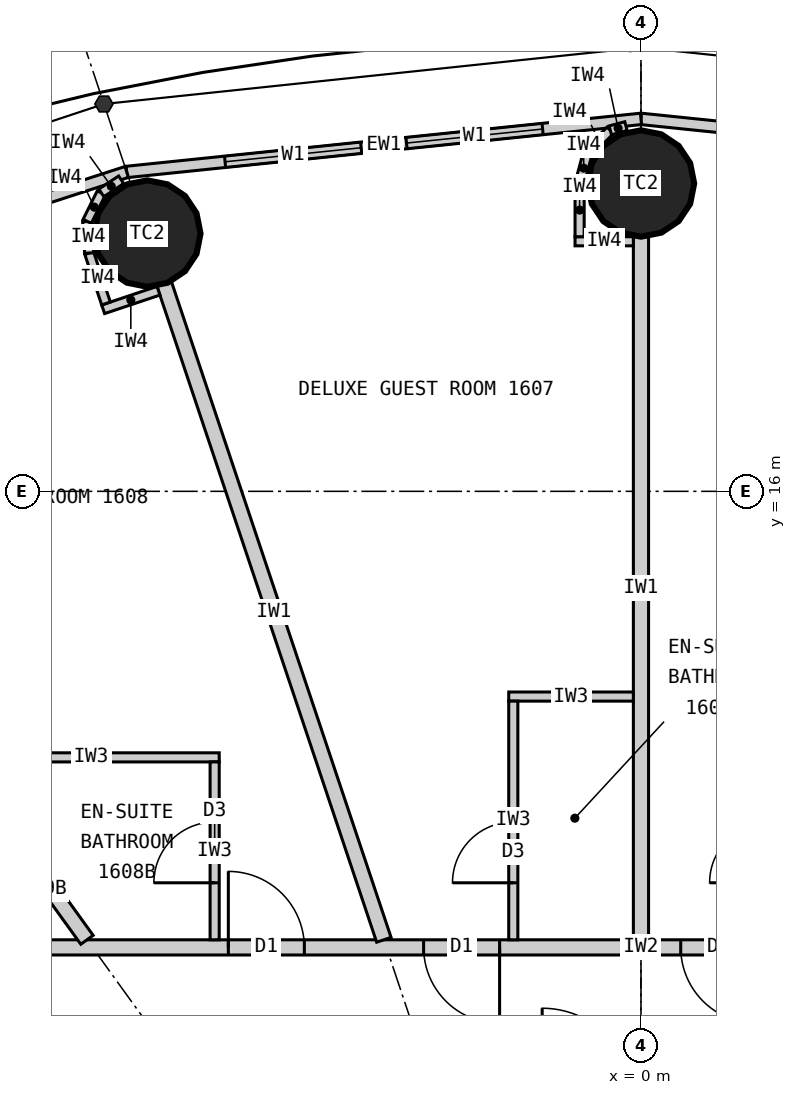
"""IFC4 building model, lengths in metres.
Left out: names, types, materials, properties, quantities, classifications, styles, units other than length and angle.
Written with IfcOpenShell. Run it as: python <this file> out.ifc"""

import sys

from ifc_helpers import new_model, si_unit, direction, frame, frame_2d, origin, origin_2d, place, context, subcontext, project, spatial, rectangle, circle, extrude, element, fill, save


model = new_model("IFC4")
c1 = context("Model", 3, precision=1e-05, world=origin(), true_north=direction((0.0, 1.0)))
c2 = subcontext(c1, "Body", "Model", "MODEL_VIEW")
j1 = project(units=[si_unit("LENGTHUNIT", "METRE"), si_unit("PLANEANGLEUNIT", "RADIAN")], contexts=[c1])
p1 = place(None, origin())
s1 = spatial("IfcSite", under=j1, at=p1, CompositionType="ELEMENT")
p2 = place(p1, origin())
s2 = spatial("IfcBuilding", under=s1, at=p2, CompositionType="ELEMENT")
p3 = place(p2, frame((0.0, 0.0, 67.2)))
s3 = spatial("IfcBuildingStorey", under=s2, at=p3, CompositionType="ELEMENT", Elevation=67.2)
for number, where, z_axis, x_axis in (
    (1, (0.0, 20.05, 0.0), (0.0, 0.0, 1.0), (1.0, 0.0, 0.0)),
    (2, (-6.495, 19.391, 0.0), (0.0, 0.0, 1.0), (1.0, 0.0, 0.0)),
):
    element("IfcColumn", number, at=place(p3, frame(where, z_axis=z_axis, x_axis=x_axis)), inside=s3, PredefinedType="COLUMN", context=c2, shape_type="SweptSolid", body=[
        extrude(circle(Radius=0.7, at=origin_2d()), origin(), (0.0, 0.0, 1.0), 3.3),
    ])
p4 = place(p3, frame((6.766, 20.202, 0.0), z_axis=(0.0, 0.0, 1.0), x_axis=(-0.994721394369, 0.102612609291, 0.0)))
e3 = element("IfcWall", 3, at=p4, inside=s3, PredefinedType="ELEMENTEDWALL", context=c2, shape_type="SweptSolid", body=[
    extrude(rectangle(XDim=6.802, YDim=0.15, at=frame_2d((3.401, 0.0))), origin(), (0.0, 0.0, 1.0), 3.12),
])
p5 = place(p4, frame((1.301, 0.0, 0.9)))
e4 = element("IfcOpeningElement", 4, at=p5, cuts=e3, PredefinedType="OPENING", context=c2, shape_type="SweptSolid", body=[
    extrude(rectangle(XDim=1.8, YDim=1.9, at=frame_2d((0.9, 0.95))), frame((0.0, 0.085, 0.0), z_axis=(0.0, -1.0, 0.0), x_axis=(1.0, 0.0, 0.0)), (0.0, 0.0, 1.0), 0.17),
])
p6 = place(p4, frame((3.701, 0.0, 0.9)))
e5 = element("IfcOpeningElement", 5, at=p6, cuts=e3, PredefinedType="OPENING", context=c2, shape_type="SweptSolid", body=[
    extrude(rectangle(XDim=1.8, YDim=1.9, at=frame_2d((0.9, 0.95))), frame((0.0, 0.085, 0.0), z_axis=(0.0, -1.0, 0.0), x_axis=(1.0, 0.0, 0.0)), (0.0, 0.0, 1.0), 0.17),
])
p7 = place(p3, frame((0.0, 20.9, 0.0), z_axis=(0.0, 0.0, 1.0), x_axis=(-0.994721394369, -0.102612609291, 0.0)))
e6 = element("IfcWall", 6, at=p7, inside=s3, PredefinedType="ELEMENTEDWALL", context=c2, shape_type="SweptSolid", body=[
    extrude(rectangle(XDim=6.802, YDim=0.15, at=frame_2d((3.401, 0.0))), origin(), (0.0, 0.0, 1.0), 3.12),
])
p8 = place(p7, frame((1.301, 0.0, 0.9)))
e7 = element("IfcOpeningElement", 7, at=p8, cuts=e6, PredefinedType="OPENING", context=c2, shape_type="SweptSolid", body=[
    extrude(rectangle(XDim=1.8, YDim=1.9, at=frame_2d((0.9, 0.95))), frame((0.0, 0.085, 0.0), z_axis=(0.0, -1.0, 0.0), x_axis=(1.0, 0.0, 0.0)), (0.0, 0.0, 1.0), 0.17),
])
p9 = place(p7, frame((3.701, 0.0, 0.9)))
e8 = element("IfcOpeningElement", 8, at=p9, cuts=e6, PredefinedType="OPENING", context=c2, shape_type="SweptSolid", body=[
    extrude(rectangle(XDim=1.8, YDim=1.9, at=frame_2d((0.9, 0.95))), frame((0.0, 0.085, 0.0), z_axis=(0.0, -1.0, 0.0), x_axis=(1.0, 0.0, 0.0)), (0.0, 0.0, 1.0), 0.17),
])
p10 = place(p3, frame((-6.766, 20.202, 0.0), z_axis=(0.0, 0.0, 1.0), x_axis=(-0.951137534625, -0.308767534285, 0.0)))
e9 = element("IfcWall", 9, at=p10, inside=s3, PredefinedType="ELEMENTEDWALL", context=c2, shape_type="SweptSolid", body=[
    extrude(rectangle(XDim=6.655, YDim=0.15, at=frame_2d((3.328, 0.0))), origin(), (0.0, 0.0, 1.0), 3.12),
])
p11 = place(p10, frame((1.228, 0.0, 0.9)))
e10 = element("IfcOpeningElement", 10, at=p11, cuts=e9, PredefinedType="OPENING", context=c2, shape_type="SweptSolid", body=[
    extrude(rectangle(XDim=1.8, YDim=1.9, at=frame_2d((0.9, 0.95))), frame((0.0, 0.085, 0.0), z_axis=(0.0, -1.0, 0.0), x_axis=(1.0, 0.0, 0.0)), (0.0, 0.0, 1.0), 0.17),
])
p12 = place(p10, frame((3.628, 0.0, 0.9)))
e11 = element("IfcOpeningElement", 11, at=p12, cuts=e9, PredefinedType="OPENING", context=c2, shape_type="SweptSolid", body=[
    extrude(rectangle(XDim=1.8, YDim=1.9, at=frame_2d((0.9, 0.95))), frame((0.0, 0.085, 0.0), z_axis=(0.0, -1.0, 0.0), x_axis=(1.0, 0.0, 0.0)), (0.0, 0.0, 1.0), 0.17),
])
p13 = place(p3, frame((-14.1, 10.0, 0.0), z_axis=(0.0, 0.0, 1.0), x_axis=(1.0, 0.0, 0.0)))
e12 = element("IfcWall", 12, at=p13, inside=s3, PredefinedType="PARTITIONING", context=c2, shape_type="SweptSolid", body=[
    extrude(rectangle(XDim=28.2, YDim=0.2, at=frame_2d((14.1, 0.0))), origin(), (0.0, 0.0, 1.0), 3.12),
])
p14 = place(p13, frame((18.529, 0.0, 0.0)))
e13 = element("IfcOpeningElement", 13, at=p14, cuts=e12, PredefinedType="OPENING", context=c2, shape_type="SweptSolid", body=[
    extrude(rectangle(XDim=1.0, YDim=2.2, at=frame_2d((0.5, 1.1))), frame((0.0, 0.11, 0.0), z_axis=(0.0, -1.0, 0.0), x_axis=(1.0, 0.0, 0.0)), (0.0, 0.0, 1.0), 0.22),
])
p15 = place(p13, frame((14.623, 0.0, 0.0)))
e14 = element("IfcOpeningElement", 14, at=p15, cuts=e12, PredefinedType="OPENING", context=c2, shape_type="SweptSolid", body=[
    extrude(rectangle(XDim=1.0, YDim=2.2, at=frame_2d((0.5, 1.1))), frame((0.0, 0.11, 0.0), z_axis=(0.0, -1.0, 0.0), x_axis=(1.0, 0.0, 0.0)), (0.0, 0.0, 1.0), 0.22),
])
p16 = place(p13, frame((11.24, 0.0, 0.0)))
e15 = element("IfcOpeningElement", 15, at=p16, cuts=e12, PredefinedType="OPENING", context=c2, shape_type="SweptSolid", body=[
    extrude(rectangle(XDim=1.0, YDim=2.2, at=frame_2d((0.5, 1.1))), frame((0.0, 0.11, 0.0), z_axis=(0.0, -1.0, 0.0), x_axis=(1.0, 0.0, 0.0)), (0.0, 0.0, 1.0), 0.22),
])
p17 = place(p13, frame((8.671, 0.0, 0.0)))
e16 = element("IfcOpeningElement", 16, at=p17, cuts=e12, PredefinedType="OPENING", context=c2, shape_type="SweptSolid", body=[
    extrude(rectangle(XDim=1.0, YDim=2.2, at=frame_2d((0.5, 1.1))), frame((0.0, 0.11, 0.0), z_axis=(0.0, -1.0, 0.0), x_axis=(1.0, 0.0, 0.0)), (0.0, 0.0, 1.0), 0.22),
])
p18 = place(p13, frame((2.801, 0.0, 0.0)))
e17 = element("IfcOpeningElement", 17, at=p18, cuts=e12, PredefinedType="OPENING", context=c2, shape_type="SweptSolid", body=[
    extrude(rectangle(XDim=1.0, YDim=2.2, at=frame_2d((0.5, 1.1))), frame((0.0, 0.11, 0.0), z_axis=(0.0, -1.0, 0.0), x_axis=(1.0, 0.0, 0.0)), (0.0, 0.0, 1.0), 0.22),
])
p19 = place(p3, frame((0.0, 10.1, 0.0), z_axis=(0.0, 0.0, 1.0), x_axis=(0.0, 1.0, 0.0)))
e18 = element("IfcWall", 18, at=p19, inside=s3, PredefinedType="PARTITIONING", context=c2, shape_type="SweptSolid", body=[
    extrude(rectangle(XDim=9.25, YDim=0.2, at=frame_2d((4.625, 0.0))), origin(), (0.0, 0.0, 1.0), 2.32),
])
p20 = place(p3, frame((-3.383, 10.1, 0.0), z_axis=(0.0, 0.0, 1.0), x_axis=(-0.31759592231, 0.948226149256, 0.0)))
e19 = element("IfcWall", 19, at=p20, inside=s3, PredefinedType="PARTITIONING", context=c2, shape_type="SweptSolid", body=[
    extrude(rectangle(XDim=9.098, YDim=0.2, at=frame_2d((4.549, 0.0))), origin(), (0.0, 0.0, 1.0), 2.32),
])
p21 = place(p3, frame((-7.289, 10.1, 0.0), z_axis=(0.0, 0.0, 1.0), x_axis=(-0.585198353053, 0.810890182197, 0.0)))
e20 = element("IfcWall", 20, at=p21, inside=s3, PredefinedType="PARTITIONING", context=c2, shape_type="SweptSolid", body=[
    extrude(rectangle(XDim=8.36, YDim=0.2, at=frame_2d((4.18, 0.0))), origin(), (0.0, 0.0, 1.0), 2.32),
])
p22 = place(p3, frame((-0.1, 13.3, 0.0), z_axis=(0.0, 0.0, 1.0), x_axis=(-1.0, 0.0, 0.0)))
e21 = element("IfcWall", 21, at=p22, inside=s3, PredefinedType="PARTITIONING", context=c2, shape_type="SweptSolid", body=[
    extrude(rectangle(XDim=1.64, YDim=0.12, at=frame_2d((0.82, 0.0))), origin(), (0.0, 0.0, 1.0), 3.12),
])
p23 = place(p3, frame((-1.68, 10.1, 0.0), z_axis=(0.0, 0.0, 1.0), x_axis=(0.0, 1.0, 0.0)))
e22 = element("IfcWall", 22, at=p23, inside=s3, PredefinedType="PARTITIONING", context=c2, shape_type="SweptSolid", body=[
    extrude(rectangle(XDim=3.14, YDim=0.12, at=frame_2d((1.57, 0.0))), origin(), (0.0, 0.0, 1.0), 3.12),
])
p24 = place(p23, frame((0.75, 0.0, 0.0)))
e23 = element("IfcOpeningElement", 23, at=p24, cuts=e22, PredefinedType="OPENING", context=c2, shape_type="SweptSolid", body=[
    extrude(rectangle(XDim=0.8, YDim=2.1, at=frame_2d((0.4, 1.05))), frame((0.0, 0.07, 0.0), z_axis=(0.0, -1.0, 0.0), x_axis=(1.0, 0.0, 0.0)), (0.0, 0.0, 1.0), 0.14),
])
p25 = place(p3, frame((-8.921, 12.5, 0.0), z_axis=(0.0, 0.0, 1.0), x_axis=(1.0, 0.0, 0.0)))
e24 = element("IfcWall", 24, at=p25, inside=s3, PredefinedType="PARTITIONING", context=c2, shape_type="SweptSolid", body=[
    extrude(rectangle(XDim=3.372, YDim=0.12, at=frame_2d((1.686, 0.0))), origin(), (0.0, 0.0, 1.0), 3.12),
])
p26 = place(p3, frame((-5.609, 10.1, 0.0), z_axis=(0.0, 0.0, 1.0), x_axis=(0.0, 1.0, 0.0)))
e25 = element("IfcWall", 25, at=p26, inside=s3, PredefinedType="PARTITIONING", context=c2, shape_type="SweptSolid", body=[
    extrude(rectangle(XDim=2.34, YDim=0.12, at=frame_2d((1.17, 0.0))), origin(), (0.0, 0.0, 1.0), 3.12),
])
p27 = place(p26, frame((0.75, 0.0, 0.0)))
e26 = element("IfcOpeningElement", 26, at=p27, cuts=e25, PredefinedType="OPENING", context=c2, shape_type="SweptSolid", body=[
    extrude(rectangle(XDim=0.8, YDim=2.1, at=frame_2d((0.4, 1.05))), frame((0.0, 0.07, 0.0), z_axis=(0.0, -1.0, 0.0), x_axis=(1.0, 0.0, 0.0)), (0.0, 0.0, 1.0), 0.14),
])
p28 = place(p3, frame((-0.1, 19.29, 0.0), z_axis=(0.0, 0.0, 1.0), x_axis=(-1.0, 0.0, 0.0)))
e27 = element("IfcWall", 27, at=p28, inside=s3, PredefinedType="PARTITIONING", context=c2, shape_type="SweptSolid", body=[
    extrude(rectangle(XDim=0.767, YDim=0.12, at=frame_2d((0.384, 0.0))), origin(), (0.0, 0.0, 1.0), 3.12),
])
p29 = place(p3, frame((-0.808, 19.35, 0.0), z_axis=(0.0, 0.0, 1.0), x_axis=(0.0, 1.0, 0.0)))
e28 = element("IfcWall", 28, at=p29, inside=s3, PredefinedType="PARTITIONING", context=c2, shape_type="SweptSolid", body=[
    extrude(rectangle(XDim=0.7, YDim=0.12, at=frame_2d((0.35, 0.0))), origin(), (0.0, 0.0, 1.0), 3.12),
])
p30 = place(p3, frame((-0.808, 20.05, 0.0), z_axis=(0.0, 0.0, 1.0), x_axis=(0.2592614205, 0.965807183573, 0.0)))
e29 = element("IfcWall", 29, at=p30, inside=s3, PredefinedType="PARTITIONING", context=c2, shape_type="SweptSolid", body=[
    extrude(rectangle(XDim=0.418, YDim=0.12, at=frame_2d((0.209, 0.0))), origin(), (0.0, 0.0, 1.0), 3.12),
])
p31 = place(p3, frame((-0.699, 20.454, 0.0), z_axis=(0.0, 0.0, 1.0), x_axis=(0.707106781187, 0.707106781187, 0.0)))
e30 = element("IfcWall", 30, at=p31, inside=s3, PredefinedType="PARTITIONING", context=c2, shape_type="SweptSolid", body=[
    extrude(rectangle(XDim=0.418, YDim=0.12, at=frame_2d((0.209, 0.0))), origin(), (0.0, 0.0, 1.0), 3.12),
])
p32 = place(p3, frame((-0.404, 20.749, 0.0), z_axis=(0.0, 0.0, 1.0), x_axis=(0.965759066438, 0.25944060128, 0.0)))
e31 = element("IfcWall", 31, at=p32, inside=s3, PredefinedType="PARTITIONING", context=c2, shape_type="SweptSolid", body=[
    extrude(rectangle(XDim=0.214, YDim=0.12, at=frame_2d((0.107, 0.0))), origin(), (0.0, 0.0, 1.0), 3.12),
])
p33 = place(p3, frame((-6.348, 18.639, 0.0), z_axis=(0.0, 0.0, 1.0), x_axis=(-0.948268951266, -0.317468102437, 0.0)))
e32 = element("IfcWall", 32, at=p33, inside=s3, PredefinedType="PARTITIONING", context=c2, shape_type="SweptSolid", body=[
    extrude(rectangle(XDim=0.768, YDim=0.12, at=frame_2d((0.384, 0.0))), origin(), (0.0, 0.0, 1.0), 3.12),
])
p34 = place(p3, frame((-7.038, 18.471, 0.0), z_axis=(0.0, 0.0, 1.0), x_axis=(-0.317378466199, 0.9482989556, 0.0)))
e33 = element("IfcWall", 33, at=p34, inside=s3, PredefinedType="PARTITIONING", context=c2, shape_type="SweptSolid", body=[
    extrude(rectangle(XDim=0.7, YDim=0.12, at=frame_2d((0.35, 0.0))), origin(), (0.0, 0.0, 1.0), 3.12),
])
p35 = place(p3, frame((-7.26, 19.135, 0.0), z_axis=(0.0, 0.0, 1.0), x_axis=(-0.0613238046, 0.99811792439, 0.0)))
e34 = element("IfcWall", 34, at=p35, inside=s3, PredefinedType="PARTITIONING", context=c2, shape_type="SweptSolid", body=[
    extrude(rectangle(XDim=0.418, YDim=0.12, at=frame_2d((0.209, 0.0))), origin(), (0.0, 0.0, 1.0), 3.12),
])
p36 = place(p3, frame((-7.286, 19.552, 0.0), z_axis=(0.0, 0.0, 1.0), x_axis=(0.445810757773, 0.89512723579, 0.0)))
e35 = element("IfcWall", 35, at=p36, inside=s3, PredefinedType="PARTITIONING", context=c2, shape_type="SweptSolid", body=[
    extrude(rectangle(XDim=0.418, YDim=0.12, at=frame_2d((0.209, 0.0))), origin(), (0.0, 0.0, 1.0), 3.12),
])
p37 = place(p3, frame((-7.1, 19.926, 0.0), z_axis=(0.0, 0.0, 1.0), x_axis=(0.833488262509, 0.552537162787, 0.0)))
e36 = element("IfcWall", 36, at=p37, inside=s3, PredefinedType="PARTITIONING", context=c2, shape_type="SweptSolid", body=[
    extrude(rectangle(XDim=0.313, YDim=0.12, at=frame_2d((0.156, 0.0))), origin(), (0.0, 0.0, 1.0), 3.12),
])
p38 = place(p8, origin())
e37 = element("IfcWindow", 37, at=p38, inside=s3, PartitioningType="SINGLE_PANEL", PredefinedType="WINDOW", context=c2, shape_type="SweptSolid", body=[
    extrude(rectangle(XDim=1.8, YDim=1.9, at=frame_2d((0.9, 0.95))), frame((0.0, 0.03, 0.0), z_axis=(0.0, -1.0, 0.0), x_axis=(1.0, 0.0, 0.0)), (0.0, 0.0, 1.0), 0.06),
])
fill(e7, e37)
p39 = place(p9, origin())
e38 = element("IfcWindow", 38, at=p39, inside=s3, PartitioningType="SINGLE_PANEL", PredefinedType="WINDOW", context=c2, shape_type="SweptSolid", body=[
    extrude(rectangle(XDim=1.8, YDim=1.9, at=frame_2d((0.9, 0.95))), frame((0.0, 0.03, 0.0), z_axis=(0.0, -1.0, 0.0), x_axis=(1.0, 0.0, 0.0)), (0.0, 0.0, 1.0), 0.06),
])
fill(e8, e38)
p40 = place(p15, origin())
e39 = element("IfcDoor", 39, at=p40, inside=s3, OperationType="SINGLE_SWING_RIGHT", PredefinedType="DOOR", context=c2, shape_type="SweptSolid", body=[
    extrude(rectangle(XDim=1.0, YDim=2.2, at=frame_2d((0.5, 1.1))), frame((0.0, 0.025, 0.0), z_axis=(0.0, -1.0, 0.0), x_axis=(1.0, 0.0, 0.0)), (0.0, 0.0, 1.0), 0.05),
])
fill(e14, e39)
p41 = place(p24, origin())
e40 = element("IfcDoor", 40, at=p41, inside=s3, OperationType="SINGLE_SWING_LEFT", PredefinedType="DOOR", context=c2, shape_type="SweptSolid", body=[
    extrude(rectangle(XDim=0.8, YDim=2.1, at=frame_2d((0.4, 1.05))), frame((0.0, 0.025, 0.0), z_axis=(0.0, -1.0, 0.0), x_axis=(1.0, 0.0, 0.0)), (0.0, 0.0, 1.0), 0.05),
])
fill(e23, e40)
p42 = place(p16, origin())
e41 = element("IfcDoor", 41, at=p42, inside=s3, OperationType="SINGLE_SWING_RIGHT", PredefinedType="DOOR", context=c2, shape_type="SweptSolid", body=[
    extrude(rectangle(XDim=1.0, YDim=2.2, at=frame_2d((0.5, 1.1))), frame((0.0, 0.025, 0.0), z_axis=(0.0, -1.0, 0.0), x_axis=(1.0, 0.0, 0.0)), (0.0, 0.0, 1.0), 0.05),
])
fill(e15, e41)
p43 = place(p27, origin())
e42 = element("IfcDoor", 42, at=p43, inside=s3, OperationType="SINGLE_SWING_LEFT", PredefinedType="DOOR", context=c2, shape_type="SweptSolid", body=[
    extrude(rectangle(XDim=0.8, YDim=2.1, at=frame_2d((0.4, 1.05))), frame((0.0, 0.025, 0.0), z_axis=(0.0, -1.0, 0.0), x_axis=(1.0, 0.0, 0.0)), (0.0, 0.0, 1.0), 0.05),
])
fill(e26, e42)
p44 = place(p17, origin())
e43 = element("IfcDoor", 43, at=p44, inside=s3, OperationType="SINGLE_SWING_LEFT", PredefinedType="DOOR", context=c2, shape_type="SweptSolid", body=[
    extrude(rectangle(XDim=1.0, YDim=2.2, at=frame_2d((0.5, 1.1))), frame((0.0, 0.025, 0.0), z_axis=(0.0, -1.0, 0.0), x_axis=(1.0, 0.0, 0.0)), (0.0, 0.0, 1.0), 0.05),
])
fill(e16, e43)
save(model, sys.argv[1])
